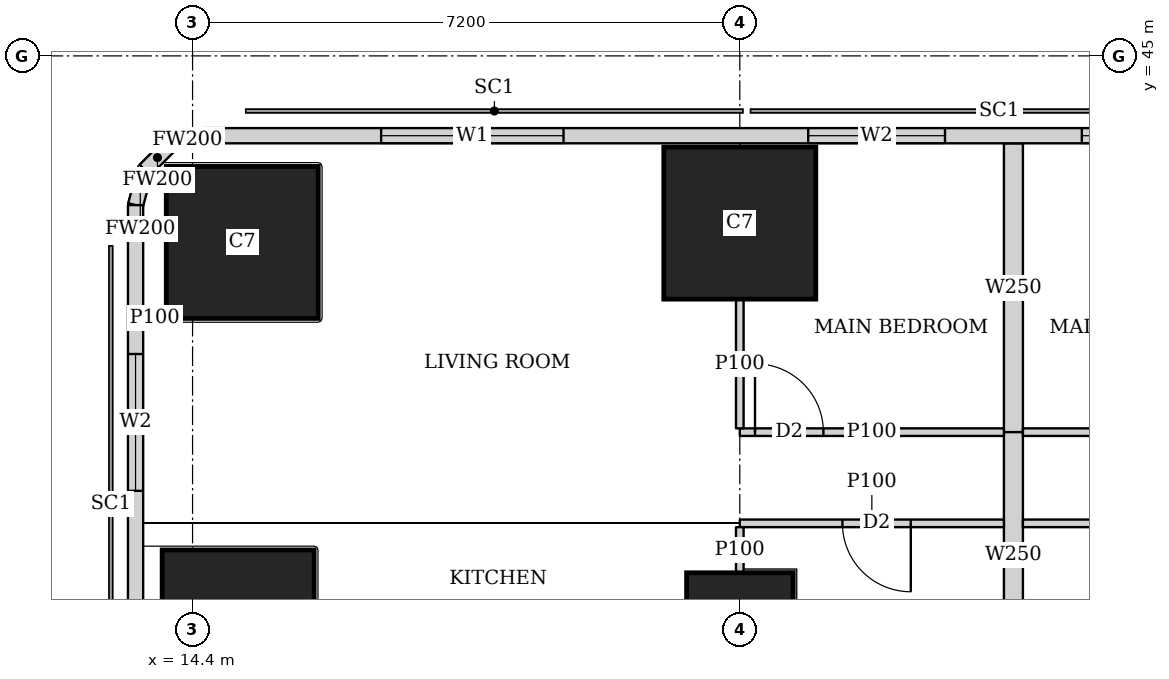
"""IFC4 building model, lengths in metres.
Left out: names, types, materials, properties, quantities, classifications, styles, units other than length and angle.
Written with IfcOpenShell. Run it as: python <this file> out.ifc"""

import sys

from ifc_helpers import new_model, si_unit, direction, frame, frame_2d, origin, origin_2d, place, context, subcontext, project, spatial, rectangle, extrude, element, fill, save


model = new_model("IFC4")
c1 = context("Model", 3, precision=1e-05, world=origin(), true_north=direction((0.0, 1.0)))
c2 = subcontext(c1, "Body", "Model", "MODEL_VIEW")
j1 = project(units=[si_unit("LENGTHUNIT", "METRE"), si_unit("PLANEANGLEUNIT", "RADIAN")], contexts=[c1])
p1 = place(None, origin())
s1 = spatial("IfcSite", under=j1, at=p1, CompositionType="ELEMENT")
p2 = place(p1, origin())
s2 = spatial("IfcBuilding", under=s1, at=p2, CompositionType="ELEMENT")
p3 = place(p2, frame((0.0, 0.0, 255.35)))
s3 = spatial("IfcBuildingStorey", under=s2, at=p3, CompositionType="ELEMENT", Elevation=255.35)
p4 = place(p3, frame((15.0, 37.5, 0.0), z_axis=(0.0, 0.0, 1.0), x_axis=(1.0, 0.0, 0.0)))
e1 = element("IfcColumn", 1, at=p4, inside=s3, PredefinedType="COLUMN", context=c2, shape_type="SweptSolid", body=[
    extrude(rectangle(XDim=2.0, YDim=2.0, at=origin_2d()), origin(), (0.0, 0.0, 1.0), 3.75),
])
p5 = place(p3, frame((21.6, 37.5, 0.0), z_axis=(0.0, 0.0, 1.0), x_axis=(1.0, 0.0, 0.0)))
e2 = element("IfcColumn", 2, at=p5, inside=s3, PredefinedType="COLUMN", context=c2, shape_type="SweptSolid", body=[
    extrude(rectangle(XDim=1.4, YDim=1.4, at=origin_2d()), origin(), (0.0, 0.0, 1.0), 3.75),
])
for number, where, z_axis, x_axis in (
    (3, (15.054, 42.546, 0.0), (0.0, 0.0, 1.0), (1.0, 0.0, 0.0)),
    (4, (21.6, 42.8, 0.0), (0.0, 0.0, 1.0), (1.0, 0.0, 0.0)),
):
    element("IfcColumn", number, at=place(p3, frame(where, z_axis=z_axis, x_axis=x_axis)), inside=s3, PredefinedType="COLUMN", context=c2, shape_type="SweptSolid", body=[
        extrude(rectangle(XDim=2.0, YDim=2.0, at=origin_2d()), origin(), (0.0, 0.0, 1.0), 3.75),
    ])
p6 = place(p3, frame((42.103, 43.95, 0.0), z_axis=(0.0, 0.0, 1.0), x_axis=(-1.0, 0.0, 0.0)))
e5 = element("IfcWall", 5, at=p6, inside=s3, PredefinedType="SOLIDWALL", context=c2, shape_type="SweptSolid", body=[
    extrude(rectangle(XDim=27.54, YDim=0.2, at=frame_2d((13.77, 0.0))), origin(), (0.0, 0.0, 1.0), 3.5),
])
p7 = place(p6, frame((10.603, 0.0, 0.9)))
e6 = element("IfcOpeningElement", 6, at=p7, cuts=e5, PredefinedType="OPENING", context=c2, shape_type="SweptSolid", body=[
    extrude(rectangle(XDim=1.8, YDim=1.5, at=frame_2d((0.9, 0.75))), frame((0.0, 0.11, 0.0), z_axis=(0.0, -1.0, 0.0), x_axis=(1.0, 0.0, 0.0)), (0.0, 0.0, 1.0), 0.22),
])
p8 = place(p6, frame((14.203, 0.0, 0.9)))
e7 = element("IfcOpeningElement", 7, at=p8, cuts=e5, PredefinedType="OPENING", context=c2, shape_type="SweptSolid", body=[
    extrude(rectangle(XDim=1.8, YDim=1.5, at=frame_2d((0.9, 0.75))), frame((0.0, 0.11, 0.0), z_axis=(0.0, -1.0, 0.0), x_axis=(1.0, 0.0, 0.0)), (0.0, 0.0, 1.0), 0.22),
])
p9 = place(p6, frame((17.803, 0.0, 0.9)))
e8 = element("IfcOpeningElement", 8, at=p9, cuts=e5, PredefinedType="OPENING", context=c2, shape_type="SweptSolid", body=[
    extrude(rectangle(XDim=1.8, YDim=1.5, at=frame_2d((0.9, 0.75))), frame((0.0, 0.11, 0.0), z_axis=(0.0, -1.0, 0.0), x_axis=(1.0, 0.0, 0.0)), (0.0, 0.0, 1.0), 0.22),
])
p10 = place(p6, frame((22.822, 0.0, 0.9)))
e9 = element("IfcOpeningElement", 9, at=p10, cuts=e5, PredefinedType="OPENING", context=c2, shape_type="SweptSolid", body=[
    extrude(rectangle(XDim=2.4, YDim=1.5, at=frame_2d((1.2, 0.75))), frame((0.0, 0.11, 0.0), z_axis=(0.0, -1.0, 0.0), x_axis=(1.0, 0.0, 0.0)), (0.0, 0.0, 1.0), 0.22),
])
p11 = place(p3, frame((14.563, 43.95, 0.0), z_axis=(0.0, 0.0, 1.0), x_axis=(-0.965655254015, -0.259826731483, 0.0)))
e10 = element("IfcWall", 10, at=p11, inside=s3, PredefinedType="SOLIDWALL", context=c2, shape_type="SweptSolid", body=[
    extrude(rectangle(XDim=0.477, YDim=0.2, at=frame_2d((0.239, 0.0))), origin(), (0.0, 0.0, 1.0), 3.5),
])
p12 = place(p3, frame((14.102, 43.826, 0.0), z_axis=(0.0, 0.0, 1.0), x_axis=(-0.707369890659, -0.706843573776, 0.0)))
e11 = element("IfcWall", 11, at=p12, inside=s3, PredefinedType="SOLIDWALL", context=c2, shape_type="SweptSolid", body=[
    extrude(rectangle(XDim=0.464, YDim=0.2, at=frame_2d((0.232, 0.0))), origin(), (0.0, 0.0, 1.0), 3.5),
])
p13 = place(p3, frame((13.774, 43.498, 0.0), z_axis=(0.0, 0.0, 1.0), x_axis=(-0.259826731483, -0.965655254015, 0.0)))
e12 = element("IfcWall", 12, at=p13, inside=s3, PredefinedType="SOLIDWALL", context=c2, shape_type="SweptSolid", body=[
    extrude(rectangle(XDim=0.477, YDim=0.2, at=frame_2d((0.239, 0.0))), origin(), (0.0, 0.0, 1.0), 3.5),
])
p14 = place(p3, frame((13.65, 43.037, 0.0), z_axis=(0.0, 0.0, 1.0), x_axis=(0.0, -1.0, 0.0)))
e13 = element("IfcWall", 13, at=p14, inside=s3, PredefinedType="SOLIDWALL", context=c2, shape_type="SweptSolid", body=[
    extrude(rectangle(XDim=35.374, YDim=0.2, at=frame_2d((17.687, 0.0))), origin(), (0.0, 0.0, 1.0), 3.5),
])
p15 = place(p14, frame((1.959, 0.0, 0.9)))
e14 = element("IfcOpeningElement", 14, at=p15, cuts=e13, PredefinedType="OPENING", context=c2, shape_type="SweptSolid", body=[
    extrude(rectangle(XDim=1.8, YDim=1.5, at=frame_2d((0.9, 0.75))), frame((0.0, 0.11, 0.0), z_axis=(0.0, -1.0, 0.0), x_axis=(1.0, 0.0, 0.0)), (0.0, 0.0, 1.0), 0.22),
])
p16 = place(p3, frame((14.054, 41.546, 0.0), z_axis=(0.0, 0.0, 1.0), x_axis=(-1.0, 0.0, 0.0)))
e15 = element("IfcWall", 15, at=p16, inside=s3, PredefinedType="PARTITIONING", context=c2, shape_type="SweptSolid", body=[
    extrude(rectangle(XDim=0.304, YDim=0.1, at=frame_2d((0.152, 0.0))), origin(), (0.0, 0.0, 1.0), 3.5),
])
p17 = place(p3, frame((21.6, 40.05, 0.0), z_axis=(0.0, 0.0, 1.0), x_axis=(1.0, 0.0, 0.0)))
e16 = element("IfcWall", 16, at=p17, inside=s3, PredefinedType="PARTITIONING", context=c2, shape_type="SweptSolid", body=[
    extrude(rectangle(XDim=3.475, YDim=0.1, at=frame_2d((1.737, 0.0))), origin(), (0.0, 0.0, 1.0), 3.5),
])
p18 = place(p17, frame((0.2, 0.0, 0.0)))
e17 = element("IfcOpeningElement", 17, at=p18, cuts=e16, PredefinedType="OPENING", context=c2, shape_type="SweptSolid", body=[
    extrude(rectangle(XDim=0.9, YDim=2.1, at=frame_2d((0.45, 1.05))), frame((0.0, 0.06, 0.0), z_axis=(0.0, -1.0, 0.0), x_axis=(1.0, 0.0, 0.0)), (0.0, 0.0, 1.0), 0.12),
])
p19 = place(p3, frame((21.6, 38.85, 0.0), z_axis=(0.0, 0.0, 1.0), x_axis=(1.0, 0.0, 0.0)))
e18 = element("IfcWall", 18, at=p19, inside=s3, PredefinedType="PARTITIONING", context=c2, shape_type="SweptSolid", body=[
    extrude(rectangle(XDim=3.475, YDim=0.1, at=frame_2d((1.737, 0.0))), origin(), (0.0, 0.0, 1.0), 3.5),
])
p20 = place(p19, frame((1.35, 0.0, 0.0)))
e19 = element("IfcOpeningElement", 19, at=p20, cuts=e18, PredefinedType="OPENING", context=c2, shape_type="SweptSolid", body=[
    extrude(rectangle(XDim=0.9, YDim=2.1, at=frame_2d((0.45, 1.05))), frame((0.0, 0.06, 0.0), z_axis=(0.0, -1.0, 0.0), x_axis=(1.0, 0.0, 0.0)), (0.0, 0.0, 1.0), 0.12),
])
p21 = place(p3, frame((21.6, 40.1, 0.0), z_axis=(0.0, 0.0, 1.0), x_axis=(0.0, 1.0, 0.0)))
e20 = element("IfcWall", 20, at=p21, inside=s3, PredefinedType="PARTITIONING", context=c2, shape_type="SweptSolid", body=[
    extrude(rectangle(XDim=1.699, YDim=0.1, at=frame_2d((0.85, 0.0))), origin(), (0.0, 0.0, 1.0), 3.5),
])
p22 = place(p3, frame((21.6, 38.201, 0.0), z_axis=(0.0, 0.0, 1.0), x_axis=(0.0, 1.0, 0.0)))
e21 = element("IfcWall", 21, at=p22, inside=s3, PredefinedType="PARTITIONING", context=c2, shape_type="SweptSolid", body=[
    extrude(rectangle(XDim=0.599, YDim=0.1, at=frame_2d((0.3, 0.0))), origin(), (0.0, 0.0, 1.0), 3.5),
])
p23 = place(p3, frame((25.325, 40.05, 0.0), z_axis=(0.0, 0.0, 1.0), x_axis=(1.0, 0.0, 0.0)))
e22 = element("IfcWall", 22, at=p23, inside=s3, PredefinedType="PARTITIONING", context=c2, shape_type="SweptSolid", body=[
    extrude(rectangle(XDim=3.475, YDim=0.1, at=frame_2d((1.738, 0.0))), origin(), (0.0, 0.0, 1.0), 3.5),
])
p24 = place(p23, frame((2.375, 0.0, 0.0)))
e23 = element("IfcOpeningElement", 23, at=p24, cuts=e22, PredefinedType="OPENING", context=c2, shape_type="SweptSolid", body=[
    extrude(rectangle(XDim=0.9, YDim=2.1, at=frame_2d((0.45, 1.05))), frame((0.0, 0.06, 0.0), z_axis=(0.0, -1.0, 0.0), x_axis=(1.0, 0.0, 0.0)), (0.0, 0.0, 1.0), 0.12),
])
p25 = place(p3, frame((25.325, 38.85, 0.0), z_axis=(0.0, 0.0, 1.0), x_axis=(1.0, 0.0, 0.0)))
e24 = element("IfcWall", 24, at=p25, inside=s3, PredefinedType="PARTITIONING", context=c2, shape_type="SweptSolid", body=[
    extrude(rectangle(XDim=3.475, YDim=0.1, at=frame_2d((1.738, 0.0))), origin(), (0.0, 0.0, 1.0), 3.5),
])
p26 = place(p25, frame((1.225, 0.0, 0.0)))
e25 = element("IfcOpeningElement", 25, at=p26, cuts=e24, PredefinedType="OPENING", context=c2, shape_type="SweptSolid", body=[
    extrude(rectangle(XDim=0.9, YDim=2.1, at=frame_2d((0.45, 1.05))), frame((0.0, 0.06, 0.0), z_axis=(0.0, -1.0, 0.0), x_axis=(1.0, 0.0, 0.0)), (0.0, 0.0, 1.0), 0.12),
])
p27 = place(p3, frame((25.2, 40.05, 0.0), z_axis=(0.0, 0.0, 1.0), x_axis=(0.0, 1.0, 0.0)))
e26 = element("IfcWall", 26, at=p27, inside=s3, PredefinedType="SOLIDWALL", context=c2, shape_type="SweptSolid", body=[
    extrude(rectangle(XDim=3.8, YDim=0.25, at=frame_2d((1.9, 0.0))), origin(), (0.0, 0.0, 1.0), 2.05),
])
p28 = place(p3, frame((25.2, 36.825, 0.0), z_axis=(0.0, 0.0, 1.0), x_axis=(0.0, 1.0, 0.0)))
e27 = element("IfcWall", 27, at=p28, inside=s3, PredefinedType="SOLIDWALL", context=c2, shape_type="SweptSolid", body=[
    extrude(rectangle(XDim=3.225, YDim=0.25, at=frame_2d((1.613, 0.0))), origin(), (0.0, 0.0, 1.0), 3.5),
])
p29 = place(p8, origin())
e28 = element("IfcWindow", 28, at=p29, inside=s3, PartitioningType="SINGLE_PANEL", PredefinedType="WINDOW", context=c2, shape_type="SweptSolid", body=[
    extrude(rectangle(XDim=1.8, YDim=1.5, at=frame_2d((0.9, 0.75))), frame((0.0, 0.03, 0.0), z_axis=(0.0, -1.0, 0.0), x_axis=(1.0, 0.0, 0.0)), (0.0, 0.0, 1.0), 0.06),
])
fill(e7, e28)
p30 = place(p9, origin())
e29 = element("IfcWindow", 29, at=p30, inside=s3, PartitioningType="SINGLE_PANEL", PredefinedType="WINDOW", context=c2, shape_type="SweptSolid", body=[
    extrude(rectangle(XDim=1.8, YDim=1.5, at=frame_2d((0.9, 0.75))), frame((0.0, 0.03, 0.0), z_axis=(0.0, -1.0, 0.0), x_axis=(1.0, 0.0, 0.0)), (0.0, 0.0, 1.0), 0.06),
])
fill(e8, e29)
p31 = place(p10, origin())
e30 = element("IfcWindow", 30, at=p31, inside=s3, PartitioningType="SINGLE_PANEL", PredefinedType="WINDOW", context=c2, shape_type="SweptSolid", body=[
    extrude(rectangle(XDim=2.4, YDim=1.5, at=frame_2d((1.2, 0.75))), frame((0.0, 0.03, 0.0), z_axis=(0.0, -1.0, 0.0), x_axis=(1.0, 0.0, 0.0)), (0.0, 0.0, 1.0), 0.06),
])
fill(e9, e30)
p32 = place(p15, origin())
e31 = element("IfcWindow", 31, at=p32, inside=s3, PartitioningType="SINGLE_PANEL", PredefinedType="WINDOW", context=c2, shape_type="SweptSolid", body=[
    extrude(rectangle(XDim=1.8, YDim=1.5, at=frame_2d((0.9, 0.75))), frame((0.0, 0.03, 0.0), z_axis=(0.0, -1.0, 0.0), x_axis=(1.0, 0.0, 0.0)), (0.0, 0.0, 1.0), 0.06),
])
fill(e14, e31)
p33 = place(p18, origin())
e32 = element("IfcDoor", 32, at=p33, inside=s3, OperationType="SINGLE_SWING_LEFT", PredefinedType="DOOR", context=c2, shape_type="SweptSolid", body=[
    extrude(rectangle(XDim=0.9, YDim=2.1, at=frame_2d((0.45, 1.05))), frame((0.0, 0.025, 0.0), z_axis=(0.0, -1.0, 0.0), x_axis=(1.0, 0.0, 0.0)), (0.0, 0.0, 1.0), 0.05),
])
fill(e17, e32)
p34 = place(p20, origin())
e33 = element("IfcDoor", 33, at=p34, inside=s3, OperationType="SINGLE_SWING_LEFT", PredefinedType="DOOR", context=c2, shape_type="SweptSolid", body=[
    extrude(rectangle(XDim=0.9, YDim=2.1, at=frame_2d((0.45, 1.05))), frame((0.0, 0.025, 0.0), z_axis=(0.0, -1.0, 0.0), x_axis=(1.0, 0.0, 0.0)), (0.0, 0.0, 1.0), 0.05),
])
fill(e19, e33)
save(model, sys.argv[1])
